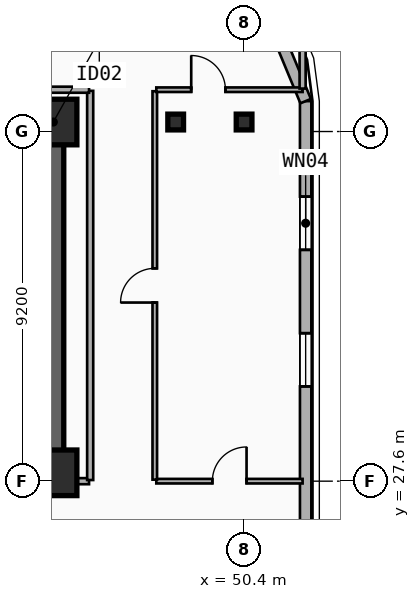
"""IFC4 building model, lengths in metres.
Left out: names, types, materials, properties, quantities, classifications, styles, units other than length and angle.
Written with IfcOpenShell. Run it as: python <this file> out.ifc"""

import sys

from ifc_helpers import new_model, si_unit, direction, frame, frame_2d, origin, origin_2d, place, context, subcontext, project, spatial, rectangle, i_section, extrude, element, fill, save


model = new_model("IFC4")
c1 = context("Model", 3, precision=1e-05, world=origin(), true_north=direction((0.0, 1.0)))
c2 = subcontext(c1, "Body", "Model", "MODEL_VIEW")
j1 = project(units=[si_unit("LENGTHUNIT", "METRE"), si_unit("PLANEANGLEUNIT", "RADIAN")], contexts=[c1])
p1 = place(None, origin())
s1 = spatial("IfcSite", under=j1, at=p1, CompositionType="ELEMENT")
p2 = place(p1, origin())
s2 = spatial("IfcBuilding", under=s1, at=p2, CompositionType="ELEMENT")
p3 = place(p2, frame((0.0, 0.0, 166.1)))
s3 = spatial("IfcBuildingStorey", under=s2, at=p3, CompositionType="ELEMENT", Elevation=166.1)
p4 = place(p3, frame((12.15, 37.05, 0.0), z_axis=(0.0, 0.0, 1.0), x_axis=(1.0, 0.0, 0.0)))
e1 = element("IfcWall", 1, at=p4, inside=s3, PredefinedType="SHEAR", context=c2, shape_type="SweptSolid", body=[
    extrude(rectangle(XDim=33.23, YDim=0.55, at=frame_2d((16.615, 0.0))), origin(), (0.0, 0.0, 1.0), 3.55),
])
p5 = place(p3, frame((45.38, 27.82, 0.0), z_axis=(0.0, 0.0, 1.0), x_axis=(-1.0, 0.0, 0.0)))
e2 = element("IfcWall", 2, at=p5, inside=s3, PredefinedType="SHEAR", context=c2, shape_type="SweptSolid", body=[
    extrude(rectangle(XDim=12.23, YDim=0.55, at=frame_2d((6.115, 0.0))), origin(), (0.0, 0.0, 1.0), 3.55),
])
p6 = place(p5, frame((9.93, 0.0, 0.0)))
e3 = element("IfcOpeningElement", 3, at=p6, cuts=e2, PredefinedType="OPENING", context=c2, shape_type="SweptSolid", body=[
    extrude(rectangle(XDim=1.1, YDim=2.15, at=frame_2d((0.55, 1.075))), frame((0.0, 0.285, 0.0), z_axis=(0.0, -1.0, 0.0), x_axis=(1.0, 0.0, 0.0)), (0.0, 0.0, 1.0), 0.57),
])
p7 = place(p5, frame((6.23, 0.0, 0.0)))
e4 = element("IfcOpeningElement", 4, at=p7, cuts=e2, PredefinedType="OPENING", context=c2, shape_type="SweptSolid", body=[
    extrude(rectangle(XDim=1.1, YDim=2.15, at=frame_2d((0.55, 1.075))), frame((0.0, 0.285, 0.0), z_axis=(0.0, -1.0, 0.0), x_axis=(1.0, 0.0, 0.0)), (0.0, 0.0, 1.0), 0.57),
])
p8 = place(p3, frame((45.38, 28.095, 0.0), z_axis=(0.0, 0.0, 1.0), x_axis=(0.0, 1.0, 0.0)))
e5 = element("IfcWall", 5, at=p8, inside=s3, PredefinedType="SHEAR", context=c2, shape_type="SweptSolid", body=[
    extrude(rectangle(XDim=8.68, YDim=0.55, at=frame_2d((4.34, 0.0))), origin(), (0.0, 0.0, 1.0), 3.55),
])
for number, where, z_axis, x_axis in (
    (6, (45.4, 27.82, 0.0), (0.0, 0.0, 1.0), (1.0, 0.0, 0.0)),
    (7, (45.4, 37.05, 0.0), (0.0, 0.0, 1.0), (1.0, 0.0, 0.0)),
):
    element("IfcColumn", number, at=place(p3, frame(where, z_axis=z_axis, x_axis=x_axis)), inside=s3, PredefinedType="COLUMN", context=c2, shape_type="SweptSolid", body=[
        extrude(rectangle(XDim=1.2, YDim=1.2, at=origin_2d()), origin(), (0.0, 0.0, 1.0), 3.55),
    ])
for number, where, z_axis, x_axis in (
    (8, (48.6, 37.05, 0.0), (0.0, 0.0, 1.0), (1.0, 0.0, 0.0)),
    (9, (50.4, 37.05, 0.0), (0.0, 0.0, 1.0), (1.0, 0.0, 0.0)),
):
    element("IfcColumn", number, at=place(p3, frame(where, z_axis=z_axis, x_axis=x_axis)), inside=s3, PredefinedType="COLUMN", context=c2, shape_type="SweptSolid", body=[
        extrude(i_section(OverallWidth=0.413, OverallDepth=0.415, WebThickness=0.03, FlangeThickness=0.047, FilletRadius=0.015, at=origin_2d()), origin(), (0.0, 0.0, 1.0), 3.55),
    ])
p9 = place(p3, frame((52.02, 37.6, 0.0), z_axis=(0.0, 0.0, 1.0), x_axis=(0.0, -1.0, 0.0)))
e10 = element("IfcWall", 10, at=p9, inside=s3, PredefinedType="SOLIDWALL", context=c2, shape_type="SweptSolid", body=[
    extrude(rectangle(XDim=23.0, YDim=0.3, at=frame_2d((11.5, 0.0))), origin(), (0.0, 0.0, 1.0), 3.29),
])
p10 = place(p9, frame((2.513, 0.0, 0.34)))
e11 = element("IfcOpeningElement", 11, at=p10, cuts=e10, PredefinedType="OPENING", context=c2, shape_type="SweptSolid", body=[
    extrude(rectangle(XDim=1.4, YDim=2.1, at=frame_2d((0.7, 1.05))), frame((0.0, 0.16, 0.0), z_axis=(0.0, -1.0, 0.0), x_axis=(1.0, 0.0, 0.0)), (0.0, 0.0, 1.0), 0.32),
])
p11 = place(p9, frame((6.107, 0.0, 0.34)))
e12 = element("IfcOpeningElement", 12, at=p11, cuts=e10, PredefinedType="OPENING", context=c2, shape_type="SweptSolid", body=[
    extrude(rectangle(XDim=1.4, YDim=2.1, at=frame_2d((0.7, 1.05))), frame((0.0, 0.16, 0.0), z_axis=(0.0, -1.0, 0.0), x_axis=(1.0, 0.0, 0.0)), (0.0, 0.0, 1.0), 0.32),
])
p12 = place(p9, frame((14.86, 0.0, 0.34)))
e13 = element("IfcOpeningElement", 13, at=p12, cuts=e10, PredefinedType="OPENING", context=c2, shape_type="SweptSolid", body=[
    extrude(rectangle(XDim=1.4, YDim=2.1, at=frame_2d((0.7, 1.05))), frame((0.0, 0.16, 0.0), z_axis=(0.0, -1.0, 0.0), x_axis=(1.0, 0.0, 0.0)), (0.0, 0.0, 1.0), 0.32),
])
p13 = place(p9, frame((18.77, 0.0, 0.34)))
e14 = element("IfcOpeningElement", 14, at=p13, cuts=e10, PredefinedType="OPENING", context=c2, shape_type="SweptSolid", body=[
    extrude(rectangle(XDim=1.4, YDim=2.1, at=frame_2d((0.7, 1.05))), frame((0.0, 0.16, 0.0), z_axis=(0.0, -1.0, 0.0), x_axis=(1.0, 0.0, 0.0)), (0.0, 0.0, 1.0), 0.32),
])
p14 = place(p3, frame((50.843, 40.443, 0.0), z_axis=(0.0, 0.0, 1.0), x_axis=(0.382704529509, -0.923870793506, 0.0)))
e15 = element("IfcWall", 15, at=p14, inside=s3, PredefinedType="SOLIDWALL", context=c2, shape_type="SweptSolid", body=[
    extrude(rectangle(XDim=3.077, YDim=0.3, at=frame_2d((1.538, 0.0))), origin(), (0.0, 0.0, 1.0), 3.29),
])
p15 = place(p3, frame((48.09, 27.6, 0.0), z_axis=(0.0, 0.0, 1.0), x_axis=(1.0, 0.0, 0.0)))
e16 = element("IfcWall", 16, at=p15, inside=s3, PredefinedType="PARTITIONING", context=c2, shape_type="SweptSolid", body=[
    extrude(rectangle(XDim=3.85, YDim=0.12, at=frame_2d((1.925, 0.0))), origin(), (0.0, 0.0, 1.0), 2.62),
])
p16 = place(p15, frame((1.475, 0.0, 0.0)))
e17 = element("IfcOpeningElement", 17, at=p16, cuts=e16, PredefinedType="OPENING", context=c2, shape_type="SweptSolid", body=[
    extrude(rectangle(XDim=0.9, YDim=2.1, at=frame_2d((0.45, 1.05))), frame((0.0, 0.07, 0.0), z_axis=(0.0, -1.0, 0.0), x_axis=(1.0, 0.0, 0.0)), (0.0, 0.0, 1.0), 0.14),
])
p17 = place(p3, frame((48.05, 27.64, 0.0), z_axis=(0.0, 0.0, 1.0), x_axis=(0.0, 1.0, 0.0)))
e18 = element("IfcWall", 18, at=p17, inside=s3, PredefinedType="PARTITIONING", context=c2, shape_type="SweptSolid", body=[
    extrude(rectangle(XDim=10.22, YDim=0.12, at=frame_2d((5.11, 0.0))), origin(), (0.0, 0.0, 1.0), 2.77),
])
p18 = place(p17, frame((4.66, 0.0, 0.0)))
e19 = element("IfcOpeningElement", 19, at=p18, cuts=e18, PredefinedType="OPENING", context=c2, shape_type="SweptSolid", body=[
    extrude(rectangle(XDim=0.9, YDim=2.1, at=frame_2d((0.45, 1.05))), frame((0.0, 0.07, 0.0), z_axis=(0.0, -1.0, 0.0), x_axis=(1.0, 0.0, 0.0)), (0.0, 0.0, 1.0), 0.14),
])
p19 = place(p3, frame((48.09, 37.9, 0.0), z_axis=(0.0, 0.0, 1.0), x_axis=(1.0, 0.0, 0.0)))
e20 = element("IfcWall", 20, at=p19, inside=s3, PredefinedType="PARTITIONING", context=c2, shape_type="SweptSolid", body=[
    extrude(rectangle(XDim=3.85, YDim=0.12, at=frame_2d((1.925, 0.0))), origin(), (0.0, 0.0, 1.0), 3.29),
])
p20 = place(p19, frame((0.919, 0.0, 0.0)))
e21 = element("IfcOpeningElement", 21, at=p20, cuts=e20, PredefinedType="OPENING", context=c2, shape_type="SweptSolid", body=[
    extrude(rectangle(XDim=0.9, YDim=2.1, at=frame_2d((0.45, 1.05))), frame((0.0, 0.07, 0.0), z_axis=(0.0, -1.0, 0.0), x_axis=(1.0, 0.0, 0.0)), (0.0, 0.0, 1.0), 0.14),
])
p21 = place(p3, frame((45.41, 27.6, 0.0), z_axis=(0.0, 0.0, 1.0), x_axis=(1.0, 0.0, 0.0)))
e22 = element("IfcWall", 22, at=p21, inside=s3, PredefinedType="PARTITIONING", context=c2, shape_type="SweptSolid", body=[
    extrude(rectangle(XDim=0.91, YDim=0.16, at=frame_2d((0.455, 0.0))), origin(), (0.0, 0.0, 1.0), 2.36),
])
p22 = place(p3, frame((46.35, 27.63, 0.0), z_axis=(0.0, 0.0, 1.0), x_axis=(0.0, 1.0, 0.0)))
e23 = element("IfcWall", 23, at=p22, inside=s3, PredefinedType="PARTITIONING", context=c2, shape_type="SweptSolid", body=[
    extrude(rectangle(XDim=10.24, YDim=0.16, at=frame_2d((5.12, 0.0))), origin(), (0.0, 0.0, 1.0), 2.77),
])
p23 = place(p3, frame((11.28, 37.9, 0.0), z_axis=(0.0, 0.0, 1.0), x_axis=(1.0, 0.0, 0.0)))
e24 = element("IfcWall", 24, at=p23, inside=s3, PredefinedType="PARTITIONING", context=c2, shape_type="SweptSolid", body=[
    extrude(rectangle(XDim=35.04, YDim=0.16, at=frame_2d((17.52, 0.0))), origin(), (0.0, 0.0, 1.0), 3.29),
])
p24 = place(p3, frame((51.94, 37.93, 0.0), z_axis=(0.0, 0.0, 1.0), x_axis=(0.0, 1.0, 0.0)))
e25 = element("IfcWall", 25, at=p24, inside=s3, PredefinedType="PARTITIONING", context=c2, shape_type="SweptSolid", body=[
    extrude(rectangle(XDim=1.44, YDim=0.16, at=frame_2d((0.72, 0.0))), origin(), (0.0, 0.0, 1.0), 3.29),
])
p25 = place(p10, origin())
e26 = element("IfcWindow", 26, at=p25, inside=s3, PartitioningType="SINGLE_PANEL", PredefinedType="WINDOW", context=c2, shape_type="SweptSolid", body=[
    extrude(rectangle(XDim=1.4, YDim=2.1, at=frame_2d((0.7, 1.05))), frame((0.0, 0.03, 0.0), z_axis=(0.0, -1.0, 0.0), x_axis=(1.0, 0.0, 0.0)), (0.0, 0.0, 1.0), 0.06),
])
fill(e11, e26)
p26 = place(p11, origin())
e27 = element("IfcWindow", 27, at=p26, inside=s3, PartitioningType="SINGLE_PANEL", PredefinedType="WINDOW", context=c2, shape_type="SweptSolid", body=[
    extrude(rectangle(XDim=1.4, YDim=2.1, at=frame_2d((0.7, 1.05))), frame((0.0, 0.03, 0.0), z_axis=(0.0, -1.0, 0.0), x_axis=(1.0, 0.0, 0.0)), (0.0, 0.0, 1.0), 0.06),
])
fill(e12, e27)
p27 = place(p16, origin())
e28 = element("IfcDoor", 28, at=p27, inside=s3, OperationType="SINGLE_SWING_RIGHT", PredefinedType="DOOR", context=c2, shape_type="SweptSolid", body=[
    extrude(rectangle(XDim=0.9, YDim=2.1, at=frame_2d((0.45, 1.05))), frame((0.0, 0.025, 0.0), z_axis=(0.0, -1.0, 0.0), x_axis=(1.0, 0.0, 0.0)), (0.0, 0.0, 1.0), 0.05),
])
fill(e17, e28)
p28 = place(p18, origin())
e29 = element("IfcDoor", 29, at=p28, inside=s3, OperationType="SINGLE_SWING_LEFT", PredefinedType="DOOR", context=c2, shape_type="SweptSolid", body=[
    extrude(rectangle(XDim=0.9, YDim=2.1, at=frame_2d((0.45, 1.05))), frame((0.0, 0.025, 0.0), z_axis=(0.0, -1.0, 0.0), x_axis=(1.0, 0.0, 0.0)), (0.0, 0.0, 1.0), 0.05),
])
fill(e19, e29)
p29 = place(p20, origin())
e30 = element("IfcDoor", 30, at=p29, inside=s3, OperationType="SINGLE_SWING_LEFT", PredefinedType="DOOR", context=c2, shape_type="SweptSolid", body=[
    extrude(rectangle(XDim=0.9, YDim=2.1, at=frame_2d((0.45, 1.05))), frame((0.0, 0.025, 0.0), z_axis=(0.0, -1.0, 0.0), x_axis=(1.0, 0.0, 0.0)), (0.0, 0.0, 1.0), 0.05),
])
fill(e21, e30)
save(model, sys.argv[1])
